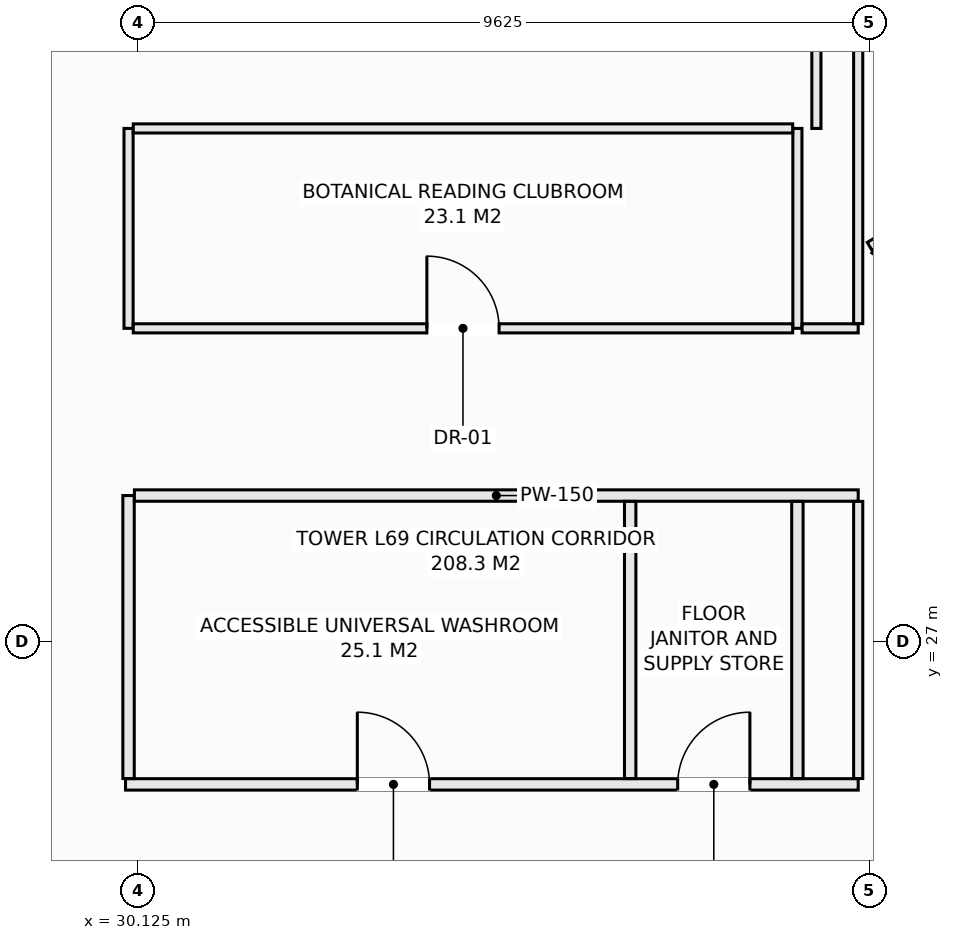
"""IFC4 building model, lengths in metres.
Left out: names, types, materials, properties, quantities, classifications, styles, units other than length and angle.
Written with IfcOpenShell. Run it as: python <this file> out.ifc"""

import sys

from ifc_helpers import new_model, si_unit, direction, frame, frame_2d, origin, place, context, subcontext, project, spatial, rectangle, extrude, element, fill, save


model = new_model("IFC4")
c1 = context("Model", 3, precision=1e-05, world=origin(), true_north=direction((0.0, 1.0)))
c2 = subcontext(c1, "Body", "Model", "MODEL_VIEW")
j1 = project(units=[si_unit("LENGTHUNIT", "METRE"), si_unit("PLANEANGLEUNIT", "RADIAN")], contexts=[c1])
p1 = place(None, origin())
s1 = spatial("IfcSite", under=j1, at=p1, CompositionType="ELEMENT")
p2 = place(p1, origin())
s2 = spatial("IfcBuilding", under=s1, at=p2, CompositionType="ELEMENT")
p3 = place(p2, frame((0.0, 0.0, 255.8)))
s3 = spatial("IfcBuildingStorey", under=s2, at=p3, CompositionType="ELEMENT", Elevation=255.8)
p4 = place(p3, frame((29.96, 25.12, 0.0), z_axis=(0.0, 0.0, 1.0), x_axis=(1.0, 0.0, 0.0)))
e1 = element("IfcWall", 1, at=p4, inside=s3, PredefinedType="PARTITIONING", context=c2, shape_type="SweptSolid", body=[
    extrude(rectangle(XDim=9.64, YDim=0.15, at=frame_2d((4.82, 0.0))), origin(), (0.0, 0.0, 1.0), 3.03),
])
p5 = place(p4, frame((3.05, 0.0, 0.0)))
e2 = element("IfcOpeningElement", 2, at=p5, cuts=e1, PredefinedType="OPENING", context=c2, shape_type="SweptSolid", body=[
    extrude(rectangle(XDim=0.95, YDim=2.1, at=frame_2d((0.475, 1.05))), frame((0.0, 0.085, 0.0), z_axis=(0.0, -1.0, 0.0), x_axis=(1.0, 0.0, 0.0)), (0.0, 0.0, 1.0), 0.17),
])
p6 = place(p4, frame((7.265, 0.0, 0.0)))
e3 = element("IfcOpeningElement", 3, at=p6, cuts=e1, PredefinedType="OPENING", context=c2, shape_type="SweptSolid", body=[
    extrude(rectangle(XDim=0.95, YDim=2.1, at=frame_2d((0.475, 1.05))), frame((0.0, 0.085, 0.0), z_axis=(0.0, -1.0, 0.0), x_axis=(1.0, 0.0, 0.0)), (0.0, 0.0, 1.0), 0.17),
])
p7 = place(p3, frame((30.0, 25.197, 0.0), z_axis=(0.0, 0.0, 1.0), x_axis=(0.0, 1.0, 0.0)))
e4 = element("IfcWall", 4, at=p7, inside=s3, PredefinedType="PARTITIONING", context=c2, shape_type="SweptSolid", body=[
    extrude(rectangle(XDim=3.723, YDim=0.15, at=frame_2d((1.861, 0.0))), origin(), (0.0, 0.0, 1.0), 3.03),
])
p8 = place(p3, frame((30.0, 31.12, 0.0), z_axis=(0.0, 0.0, 1.0), x_axis=(0.0, 1.0, 0.0)))
e5 = element("IfcWall", 5, at=p8, inside=s3, PredefinedType="PARTITIONING", context=c2, shape_type="SweptSolid", body=[
    extrude(rectangle(XDim=2.63, YDim=0.12, at=frame_2d((1.315, 0.0))), origin(), (0.0, 0.0, 1.0), 3.03),
])
p9 = place(p3, frame((30.077, 28.92, 0.0), z_axis=(0.0, 0.0, 1.0), x_axis=(1.0, 0.0, 0.0)))
e6 = element("IfcWall", 6, at=p9, inside=s3, PredefinedType="PARTITIONING", context=c2, shape_type="SweptSolid", body=[
    extrude(rectangle(XDim=9.523, YDim=0.15, at=frame_2d((4.762, 0.0))), origin(), (0.0, 0.0, 1.0), 3.03),
])
for number, where, z_axis, x_axis in (
    (7, (36.6, 25.197, 0.0), (0.0, 0.0, 1.0), (0.0, 1.0, 0.0)),
    (8, (38.8, 25.197, 0.0), (0.0, 0.0, 1.0), (0.0, 1.0, 0.0)),
):
    element("IfcWall", number, at=place(p3, frame(where, z_axis=z_axis, x_axis=x_axis)), inside=s3, PredefinedType="PARTITIONING", context=c2, shape_type="SweptSolid", body=[
        extrude(rectangle(XDim=3.646, YDim=0.15, at=frame_2d((1.823, 0.0))), origin(), (0.0, 0.0, 1.0), 3.03),
    ])
p10 = place(p3, frame((38.8, 31.12, 0.0), z_axis=(0.0, 0.0, 1.0), x_axis=(0.0, 1.0, 0.0)))
e9 = element("IfcWall", 9, at=p10, inside=s3, PredefinedType="PARTITIONING", context=c2, shape_type="SweptSolid", body=[
    extrude(rectangle(XDim=2.63, YDim=0.12, at=frame_2d((1.315, 0.0))), origin(), (0.0, 0.0, 1.0), 3.03),
])
p11 = place(p3, frame((30.062, 31.12, 0.0), z_axis=(0.0, 0.0, 1.0), x_axis=(1.0, 0.0, 0.0)))
e10 = element("IfcWall", 10, at=p11, inside=s3, PredefinedType="PARTITIONING", context=c2, shape_type="SweptSolid", body=[
    extrude(rectangle(XDim=8.676, YDim=0.12, at=frame_2d((4.338, 0.0))), origin(), (0.0, 0.0, 1.0), 3.03),
])
p12 = place(p11, frame((3.863, 0.0, 0.0)))
e11 = element("IfcOpeningElement", 11, at=p12, cuts=e10, PredefinedType="OPENING", context=c2, shape_type="SweptSolid", body=[
    extrude(rectangle(XDim=0.95, YDim=2.1, at=frame_2d((0.475, 1.05))), frame((0.0, 0.07, 0.0), z_axis=(0.0, -1.0, 0.0), x_axis=(1.0, 0.0, 0.0)), (0.0, 0.0, 1.0), 0.14),
])
p13 = place(p3, frame((38.862, 31.12, 0.0), z_axis=(0.0, 0.0, 1.0), x_axis=(1.0, 0.0, 0.0)))
e12 = element("IfcWall", 12, at=p13, inside=s3, PredefinedType="PARTITIONING", context=c2, shape_type="SweptSolid", body=[
    extrude(rectangle(XDim=0.738, YDim=0.12, at=frame_2d((0.369, 0.0))), origin(), (0.0, 0.0, 1.0), 3.03),
])
p14 = place(p3, frame((30.062, 33.75, 0.0), z_axis=(0.0, 0.0, 1.0), x_axis=(1.0, 0.0, 0.0)))
e13 = element("IfcWall", 13, at=p14, inside=s3, PredefinedType="PARTITIONING", context=c2, shape_type="SweptSolid", body=[
    extrude(rectangle(XDim=8.676, YDim=0.12, at=frame_2d((4.338, 0.0))), origin(), (0.0, 0.0, 1.0), 3.03),
])
p15 = place(p3, frame((39.05, 33.75, 0.0), z_axis=(0.0, 0.0, 1.0), x_axis=(0.0, 1.0, 0.0)))
e14 = element("IfcWall", 14, at=p15, inside=s3, PredefinedType="PARTITIONING", context=c2, shape_type="SweptSolid", body=[
    extrude(rectangle(XDim=1.938, YDim=0.12, at=frame_2d((0.969, 0.0))), origin(), (0.0, 0.0, 1.0), 3.03),
])
p16 = place(p3, frame((39.6, 25.197, 0.0), z_axis=(0.0, 0.0, 1.0), x_axis=(0.0, 1.0, 0.0)))
e15 = element("IfcWall", 15, at=p16, inside=s3, PredefinedType="PARTITIONING", context=c2, shape_type="SweptSolid", body=[
    extrude(rectangle(XDim=3.646, YDim=0.12, at=frame_2d((1.823, 0.0))), origin(), (0.0, 0.0, 1.0), 3.03),
])
p17 = place(p3, frame((39.6, 31.182, 0.0), z_axis=(0.0, 0.0, 1.0), x_axis=(0.0, 1.0, 0.0)))
e16 = element("IfcWall", 16, at=p17, inside=s3, PredefinedType="PARTITIONING", context=c2, shape_type="SweptSolid", body=[
    extrude(rectangle(XDim=7.866, YDim=0.12, at=frame_2d((3.933, 0.0))), origin(), (0.0, 0.0, 1.0), 3.03),
])
p18 = place(p3, frame((39.75, 32.199, 0.0), z_axis=(0.0, 0.0, 1.0), x_axis=(0.857702120906, 0.514146935996, 0.0)))
e17 = element("IfcWall", 17, at=p18, inside=s3, PredefinedType="PARTITIONING", context=c2, shape_type="SweptSolid", body=[
    extrude(rectangle(XDim=1.441, YDim=0.12, at=frame_2d((0.721, 0.0))), origin(), (0.0, 0.0, 1.0), 3.03),
])
p19 = place(p3, frame((39.81, 32.163, 0.0), z_axis=(0.0, 0.0, 1.0), x_axis=(0.858011245414, -0.513630901273, 0.0)))
e18 = element("IfcWall", 18, at=p19, inside=s3, PredefinedType="PARTITIONING", context=c2, shape_type="SweptSolid", body=[
    extrude(rectangle(XDim=1.37, YDim=0.12, at=frame_2d((0.685, 0.0))), origin(), (0.0, 0.0, 1.0), 3.03),
])
p20 = place(p5, origin())
e19 = element("IfcDoor", 19, at=p20, inside=s3, OperationType="SINGLE_SWING_LEFT", PredefinedType="DOOR", context=c2, shape_type="SweptSolid", body=[
    extrude(rectangle(XDim=0.95, YDim=2.1, at=frame_2d((0.475, 1.05))), frame((0.0, 0.025, 0.0), z_axis=(0.0, -1.0, 0.0), x_axis=(1.0, 0.0, 0.0)), (0.0, 0.0, 1.0), 0.05),
])
fill(e2, e19)
p21 = place(p6, origin())
e20 = element("IfcDoor", 20, at=p21, inside=s3, OperationType="SINGLE_SWING_RIGHT", PredefinedType="DOOR", context=c2, shape_type="SweptSolid", body=[
    extrude(rectangle(XDim=0.95, YDim=2.1, at=frame_2d((0.475, 1.05))), frame((0.0, 0.025, 0.0), z_axis=(0.0, -1.0, 0.0), x_axis=(1.0, 0.0, 0.0)), (0.0, 0.0, 1.0), 0.05),
])
fill(e3, e20)
p22 = place(p12, origin())
e21 = element("IfcDoor", 21, at=p22, inside=s3, OperationType="SINGLE_SWING_LEFT", PredefinedType="DOOR", context=c2, shape_type="SweptSolid", body=[
    extrude(rectangle(XDim=0.95, YDim=2.1, at=frame_2d((0.475, 1.05))), frame((0.0, 0.025, 0.0), z_axis=(0.0, -1.0, 0.0), x_axis=(1.0, 0.0, 0.0)), (0.0, 0.0, 1.0), 0.05),
])
fill(e11, e21)
save(model, sys.argv[1])
